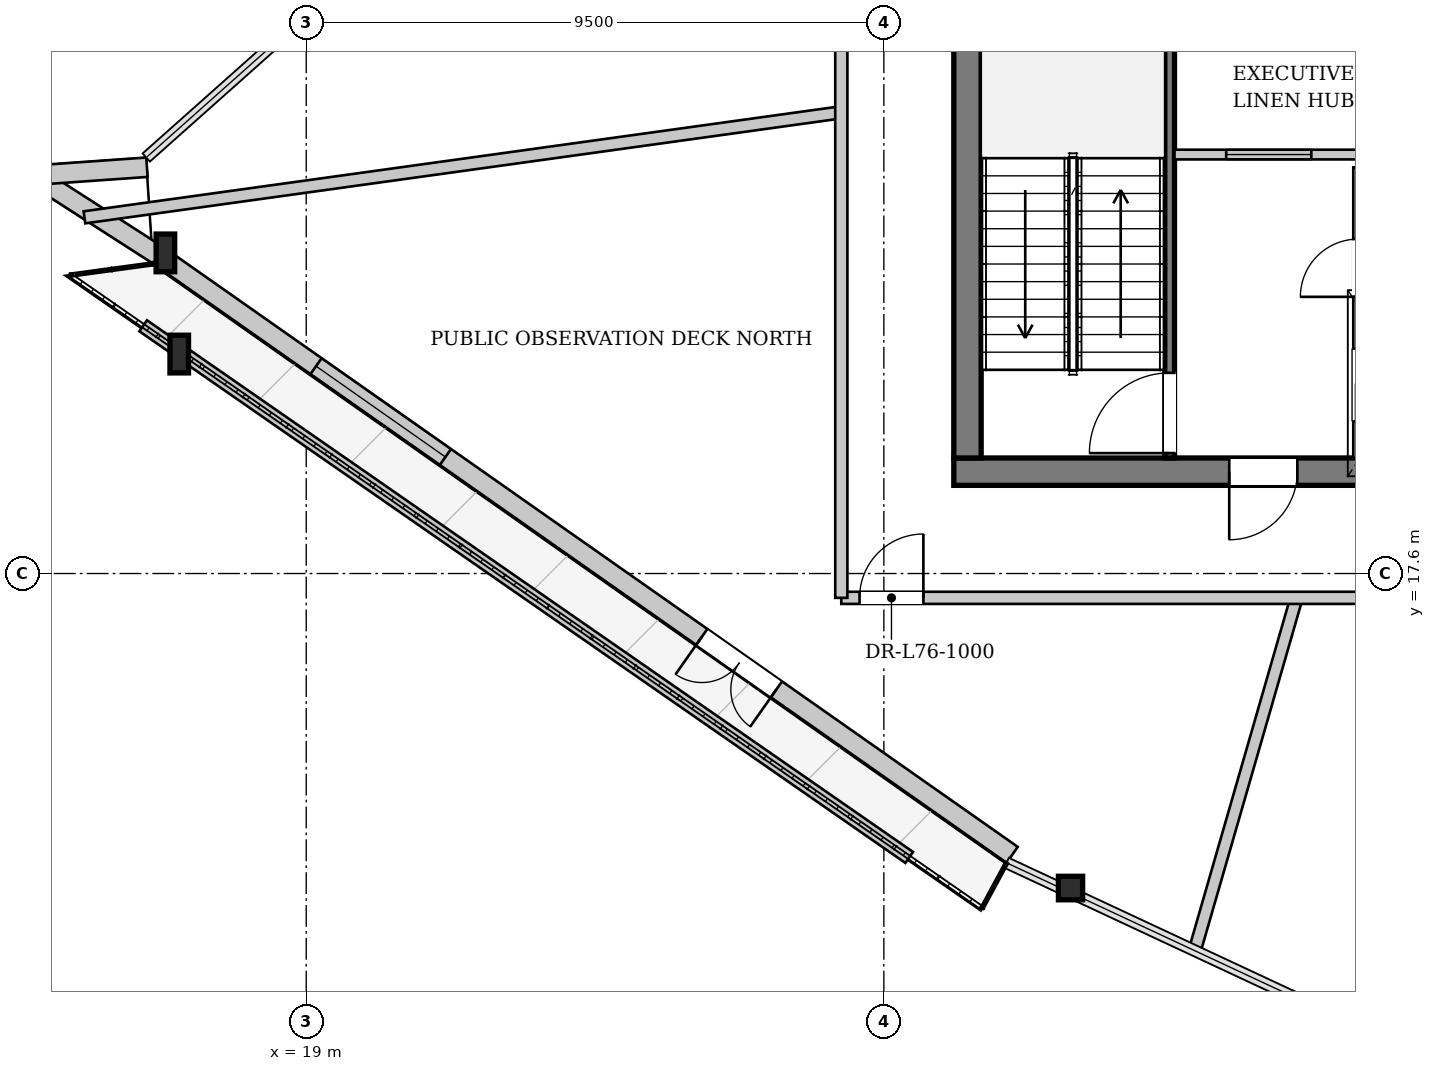
"""IFC4 building model, lengths in metres.
Left out: names, types, materials, properties, quantities, classifications, styles, units other than length and angle.
Written with IfcOpenShell. Run it as: python <this file> out.ifc"""

import sys

from ifc_helpers import new_model, si_unit, direction, frame, frame_2d, origin, origin_2d, place, context, subcontext, project, spatial, rectangle, i_section, extrude, source, transform, mapped, element, fill, save


model = new_model("IFC4")
c1 = context("Model", 3, precision=1e-05, world=origin(), true_north=direction((0.0, 1.0)))
c2 = subcontext(c1, "Body", "Model", "MODEL_VIEW")
j1 = project(units=[si_unit("LENGTHUNIT", "METRE"), si_unit("PLANEANGLEUNIT", "RADIAN")], contexts=[c1])
p1 = place(None, origin())
s1 = spatial("IfcSite", under=j1, at=p1, CompositionType="ELEMENT")
p2 = place(p1, origin())
s2 = spatial("IfcBuilding", under=s1, at=p2, CompositionType="ELEMENT")
p3 = place(p2, frame((0.0, 0.0, 286.1)))
s3 = spatial("IfcBuildingStorey", under=s2, at=p3, CompositionType="ELEMENT", Elevation=286.1)
m1 = source(origin(), c2, "Body", "SweptSolid", [
    extrude(i_section(OverallWidth=0.305, OverallDepth=0.62, WebThickness=0.021, FlangeThickness=0.04, at=origin_2d()), origin(), (0.0, 0.0, 1.0), 5.228),
])
p4 = place(p3, frame((16.369, 24.441, 0.0), z_axis=(0.120474601347, -0.599991532056, 0.790883070935), x_axis=(0.980430716793, 0.196864444651, 0.0)))
e1 = element("IfcColumn", 1, at=p4, inside=s3, PredefinedType="COLUMN", context=c2, shape_type="MappedRepresentation", body=[
    mapped(m1, transform((0.0, 0.0, 0.0), x_axis=(1.0, 0.0, 0.0), y_axis=(0.0, 1.0, 0.0), z_axis=(0.0, 0.0, 1.0), scale=1.0)),
])
m2 = source(origin(), c2, "Body", "SweptSolid", [
    extrude(i_section(OverallWidth=0.305, OverallDepth=0.62, WebThickness=0.021, FlangeThickness=0.04, at=origin_2d()), origin(), (0.0, 0.0, 1.0), 5.161),
])
p5 = place(p3, frame((16.485, 22.693, 0.0), z_axis=(0.165134400152, -0.575203181279, 0.801169102083), x_axis=(0.96117418541, 0.275942358657, 0.0)))
e2 = element("IfcColumn", 2, at=p5, inside=s3, PredefinedType="COLUMN", context=c2, shape_type="MappedRepresentation", body=[
    mapped(m2, transform((0.0, 0.0, 0.0), x_axis=(1.0, 0.0, 0.0), y_axis=(0.0, 1.0, 0.0), z_axis=(0.0, 0.0, 1.0), scale=1.0)),
])
m3 = source(origin(), c2, "Body", "SweptSolid", [
    extrude(i_section(OverallWidth=0.398, OverallDepth=0.387, WebThickness=0.019, FlangeThickness=0.029, at=origin_2d()), origin(), (0.0, 0.0, 1.0), 4.713),
])
p6 = place(p3, frame((30.518, 12.843, 0.0), z_axis=(0.446241604847, -0.176134369222, 0.877408179858), x_axis=(0.367141948921, 0.930164925883, 0.0)))
e3 = element("IfcColumn", 3, at=p6, inside=s3, PredefinedType="COLUMN", context=c2, shape_type="MappedRepresentation", body=[
    mapped(m3, transform((0.0, 0.0, 0.0), x_axis=(1.0, 0.0, 0.0), y_axis=(0.0, 1.0, 0.0), z_axis=(0.0, 0.0, 1.0), scale=1.0)),
])
p7 = place(p3, frame((30.61, 12.974, 0.0), z_axis=(0.0, 0.0, 1.0), x_axis=(-0.818470582771, 0.57454843585, 0.0)))
e4 = element("IfcWall", 4, at=p7, inside=s3, PredefinedType="SOLIDWALL", context=c2, shape_type="SweptSolid", body=[
    extrude(rectangle(XDim=17.145, YDim=0.32, at=frame_2d((8.573, 0.0))), origin(), (0.0, 0.0, 1.0), 3.662),
])
p8 = place(p7, frame((4.737, 0.0, 0.0)))
e5 = element("IfcOpeningElement", 5, at=p8, cuts=e4, PredefinedType="OPENING", context=c2, shape_type="SweptSolid", body=[
    extrude(rectangle(XDim=1.5, YDim=2.3, at=frame_2d((0.75, 1.15))), frame((0.0, 0.17, 0.0), z_axis=(0.0, -1.0, 0.0), x_axis=(1.0, 0.0, 0.0)), (0.0, 0.0, 1.0), 0.34),
])
p9 = place(p7, frame((11.388, 0.0, 0.65)))
e6 = element("IfcOpeningElement", 6, at=p9, cuts=e4, PredefinedType="OPENING", context=c2, shape_type="SweptSolid", body=[
    extrude(rectangle(XDim=2.6, YDim=2.35, at=frame_2d((1.3, 1.175))), frame((0.0, 0.17, 0.0), z_axis=(0.0, -1.0, 0.0), x_axis=(1.0, 0.0, 0.0)), (0.0, 0.0, 1.0), 0.34),
])
p10 = place(p3, frame((16.572, 22.828, 0.0), z_axis=(0.0, 0.0, 1.0), x_axis=(-0.841091692127, 0.540892563671, 0.0)))
e7 = element("IfcWall", 7, at=p10, inside=s3, PredefinedType="SOLIDWALL", context=c2, shape_type="SweptSolid", body=[
    extrude(rectangle(XDim=2.925, YDim=0.32, at=frame_2d((1.463, 0.0))), origin(), (0.0, 0.0, 1.0), 3.662),
])
p11 = place(p3, frame((14.036, 24.116, 0.0), z_axis=(0.0, 0.0, 1.0), x_axis=(0.997516376818, 0.070434920171, 0.0)))
e8 = element("IfcWall", 8, at=p11, inside=s3, PredefinedType="SOLIDWALL", context=c2, shape_type="SweptSolid", body=[
    extrude(rectangle(XDim=2.35, YDim=0.32, at=frame_2d((1.175, 0.0))), origin(), (0.0, 0.0, 1.0), 3.662),
])
p12 = place(p3, frame((16.318, 21.674, 0.0), z_axis=(0.0, 0.0, 1.0), x_axis=(0.821531955781, -0.570162473012, 0.0)))
e9 = element("IfcWall", 9, at=p12, inside=s3, PredefinedType="PARAPET", context=c2, shape_type="SweptSolid", body=[
    extrude(rectangle(XDim=15.335, YDim=0.22, at=frame_2d((7.667, 0.0))), origin(), (0.0, 0.0, 1.0), 0.3),
])
p13 = place(p3, frame((46.35, 19.275, 0.0), z_axis=(0.0, 0.0, 1.0), x_axis=(-1.0, 0.0, 0.0)))
e10 = element("IfcWall", 10, at=p13, inside=s3, PredefinedType="SHEAR", context=c2, shape_type="SweptSolid", body=[
    extrude(rectangle(XDim=16.7, YDim=0.45, at=frame_2d((8.35, 0.0))), origin(), (0.0, 0.0, 1.0), 4.12),
])
p14 = place(p13, frame((4.55, 0.0, 0.0)))
e11 = element("IfcOpeningElement", 11, at=p14, cuts=e10, PredefinedType="OPENING", context=c2, shape_type="SweptSolid", body=[
    extrude(rectangle(XDim=1.12, YDim=2.25, at=frame_2d((0.56, 1.125))), frame((0.0, 0.235, 0.0), z_axis=(0.0, -1.0, 0.0), x_axis=(1.0, 0.0, 0.0)), (0.0, 0.0, 1.0), 0.47),
])
p15 = place(p13, frame((11.05, 0.0, 0.0)))
e12 = element("IfcOpeningElement", 12, at=p15, cuts=e10, PredefinedType="OPENING", context=c2, shape_type="SweptSolid", body=[
    extrude(rectangle(XDim=1.12, YDim=2.25, at=frame_2d((0.56, 1.125))), frame((0.0, 0.235, 0.0), z_axis=(0.0, -1.0, 0.0), x_axis=(1.0, 0.0, 0.0)), (0.0, 0.0, 1.0), 0.47),
])
p16 = place(p3, frame((29.875, 19.5, 0.0), z_axis=(0.0, 0.0, 1.0), x_axis=(0.0, 1.0, 0.0)))
e13 = element("IfcWall", 13, at=p16, inside=s3, PredefinedType="SHEAR", context=c2, shape_type="SweptSolid", body=[
    extrude(rectangle(XDim=14.2, YDim=0.45, at=frame_2d((7.1, 0.0))), origin(), (0.0, 0.0, 1.0), 4.12),
])
p17 = place(p16, frame((7.42, 0.0, 0.0)))
e14 = element("IfcOpeningElement", 14, at=p17, cuts=e13, PredefinedType="OPENING", context=c2, shape_type="SweptSolid", body=[
    extrude(rectangle(XDim=1.6, YDim=2.2, at=frame_2d((0.8, 1.1))), frame((0.0, 0.235, 0.0), z_axis=(0.0, -1.0, 0.0), x_axis=(1.0, 0.0, 0.0)), (0.0, 0.0, 1.0), 0.47),
])
p18 = place(p3, frame((33.2, 19.5, 0.0), z_axis=(0.0, 0.0, 1.0), x_axis=(0.0, 1.0, 0.0)))
e15 = element("IfcWall", 15, at=p18, inside=s3, PredefinedType="PARTITIONING", context=c2, shape_type="SweptSolid", body=[
    extrude(rectangle(XDim=7.46, YDim=0.16, at=frame_2d((3.73, 0.0))), origin(), (0.0, 0.0, 1.0), 4.12),
])
p19 = place(p18, frame((0.08, 0.0, 0.0)))
e16 = element("IfcOpeningElement", 16, at=p19, cuts=e15, PredefinedType="OPENING", context=c2, shape_type="SweptSolid", body=[
    extrude(rectangle(XDim=1.32, YDim=2.2, at=frame_2d((0.66, 1.1))), frame((0.0, 0.09, 0.0), z_axis=(0.0, -1.0, 0.0), x_axis=(1.0, 0.0, 0.0)), (0.0, 0.0, 1.0), 0.18),
])
p20 = place(p3, frame((36.3, 19.5, 0.0), z_axis=(0.0, 0.0, 1.0), x_axis=(0.0, 1.0, 0.0)))
e17 = element("IfcWall", 17, at=p20, inside=s3, PredefinedType="PARTITIONING", context=c2, shape_type="SweptSolid", body=[
    extrude(rectangle(XDim=4.78, YDim=0.16, at=frame_2d((2.39, 0.0))), origin(), (0.0, 0.0, 1.0), 4.12),
])
p21 = place(p20, frame((0.6, 0.0, 0.0)))
e18 = element("IfcOpeningElement", 18, at=p21, cuts=e17, PredefinedType="OPENING", context=c2, shape_type="SweptSolid", body=[
    extrude(rectangle(XDim=1.2, YDim=2.2, at=frame_2d((0.6, 1.1))), frame((0.0, 0.09, 0.0), z_axis=(0.0, -1.0, 0.0), x_axis=(1.0, 0.0, 0.0)), (0.0, 0.0, 1.0), 0.18),
])
p22 = place(p20, frame((2.65, 0.0, 0.0)))
e19 = element("IfcOpeningElement", 19, at=p22, cuts=e17, PredefinedType="OPENING", context=c2, shape_type="SweptSolid", body=[
    extrude(rectangle(XDim=0.95, YDim=2.1, at=frame_2d((0.475, 1.05))), frame((0.0, 0.09, 0.0), z_axis=(0.0, -1.0, 0.0), x_axis=(1.0, 0.0, 0.0)), (0.0, 0.0, 1.0), 0.18),
])
p23 = place(p3, frame((33.28, 24.49, 0.0), z_axis=(0.0, 0.0, 1.0), x_axis=(1.0, 0.0, 0.0)))
e20 = element("IfcWall", 20, at=p23, inside=s3, PredefinedType="PARTITIONING", context=c2, shape_type="SweptSolid", body=[
    extrude(rectangle(XDim=9.44, YDim=0.16, at=frame_2d((4.72, 0.0))), origin(), (0.0, 0.0, 1.0), 4.12),
])
p24 = place(p23, frame((0.85, 0.0, 0.95)))
e21 = element("IfcOpeningElement", 21, at=p24, cuts=e20, PredefinedType="OPENING", context=c2, shape_type="SweptSolid", body=[
    extrude(rectangle(XDim=1.4, YDim=1.8, at=frame_2d((0.7, 0.9))), frame((0.0, 0.09, 0.0), z_axis=(0.0, -1.0, 0.0), x_axis=(1.0, 0.0, 0.0)), (0.0, 0.0, 1.0), 0.18),
])
p25 = place(p3, frame((27.8, 25.185, 0.0), z_axis=(0.0, 0.0, 1.0), x_axis=(-0.990511455739, -0.137430186092, 0.0)))
e22 = element("IfcWall", 22, at=p25, inside=s3, PredefinedType="PARTITIONING", context=c2, shape_type="SweptSolid", body=[
    extrude(rectangle(XDim=12.567, YDim=0.2, at=frame_2d((6.283, 0.0))), origin(), (0.0, 0.0, 1.0), 4.12),
])
p26 = place(p3, frame((35.287, 17.2, 0.0), z_axis=(0.0, 0.0, 1.0), x_axis=(-0.277312132805, -0.960779881658, 0.0)))
e23 = element("IfcWall", 23, at=p26, inside=s3, PredefinedType="PARTITIONING", context=c2, shape_type="SweptSolid", body=[
    extrude(rectangle(XDim=6.009, YDim=0.2, at=frame_2d((3.004, 0.0))), origin(), (0.0, 0.0, 1.0), 4.12),
])
p27 = place(p3, frame((27.8, 17.2, 0.0), z_axis=(0.0, 0.0, 1.0), x_axis=(1.0, 0.0, 0.0)))
e24 = element("IfcWall", 24, at=p27, inside=s3, PredefinedType="PARTITIONING", context=c2, shape_type="SweptSolid", body=[
    extrude(rectangle(XDim=20.4, YDim=0.2, at=frame_2d((10.2, 0.0))), origin(), (0.0, 0.0, 1.0), 3.865),
])
p28 = place(p27, frame((0.3, 0.0, 0.0)))
e25 = element("IfcOpeningElement", 25, at=p28, cuts=e24, PredefinedType="OPENING", context=c2, shape_type="SweptSolid", body=[
    extrude(rectangle(XDim=1.05, YDim=2.2, at=frame_2d((0.525, 1.1))), frame((0.0, 0.11, 0.0), z_axis=(0.0, -1.0, 0.0), x_axis=(1.0, 0.0, 0.0)), (0.0, 0.0, 1.0), 0.22),
])
p29 = place(p27, frame((15.101, 0.0, 0.0)))
e26 = element("IfcOpeningElement", 26, at=p29, cuts=e24, PredefinedType="OPENING", context=c2, shape_type="SweptSolid", body=[
    extrude(rectangle(XDim=1.05, YDim=2.2, at=frame_2d((0.525, 1.1))), frame((0.0, 0.11, 0.0), z_axis=(0.0, -1.0, 0.0), x_axis=(1.0, 0.0, 0.0)), (0.0, 0.0, 1.0), 0.22),
])
p30 = place(p3, frame((27.8, 17.2, 0.0), z_axis=(0.0, 0.0, 1.0), x_axis=(0.0, 1.0, 0.0)))
e27 = element("IfcWall", 27, at=p30, inside=s3, PredefinedType="PARTITIONING", context=c2, shape_type="SweptSolid", body=[
    extrude(rectangle(XDim=17.374, YDim=0.2, at=frame_2d((8.687, 0.0))), origin(), (0.0, 0.0, 1.0), 4.12),
])
p31 = place(p30, frame((11.62, 0.0, 0.0)))
e28 = element("IfcOpeningElement", 28, at=p31, cuts=e27, PredefinedType="OPENING", context=c2, shape_type="SweptSolid", body=[
    extrude(rectangle(XDim=1.6, YDim=2.2, at=frame_2d((0.8, 1.1))), frame((0.0, 0.11, 0.0), z_axis=(0.0, -1.0, 0.0), x_axis=(1.0, 0.0, 0.0)), (0.0, 0.0, 1.0), 0.22),
])
m4 = source(origin(), c2, "Body", "SweptSolid", [
    extrude(rectangle(XDim=1.5, YDim=2.3, at=frame_2d((0.75, 1.15))), frame((0.0, 0.025, 0.0), z_axis=(0.0, -1.0, 0.0), x_axis=(1.0, 0.0, 0.0)), (0.0, 0.0, 1.0), 0.05),
])
p32 = place(p8, origin())
e29 = element("IfcDoor", 29, at=p32, inside=s3, OperationType="DOUBLE_DOOR_SINGLE_SWING", PredefinedType="DOOR", context=c2, shape_type="MappedRepresentation", body=[
    mapped(m4, transform((0.0, 0.0, 0.0), x_axis=(1.0, 0.0, 0.0), y_axis=(0.0, 1.0, 0.0), z_axis=(0.0, 0.0, 1.0), scale=1.0)),
])
fill(e5, e29)
m5 = source(origin(), c2, "Body", "SweptSolid", [
    extrude(rectangle(XDim=2.6, YDim=2.35, at=frame_2d((1.3, 1.175))), frame((0.0, 0.03, 0.0), z_axis=(0.0, -1.0, 0.0), x_axis=(1.0, 0.0, 0.0)), (0.0, 0.0, 1.0), 0.06),
])
p33 = place(p9, origin())
e30 = element("IfcWindow", 30, at=p33, inside=s3, PartitioningType="SINGLE_PANEL", PredefinedType="WINDOW", context=c2, shape_type="MappedRepresentation", body=[
    mapped(m5, transform((0.0, 0.0, 0.0), x_axis=(1.0, 0.0, 0.0), y_axis=(0.0, 1.0, 0.0), z_axis=(0.0, 0.0, 1.0), scale=1.0)),
])
fill(e6, e30)
m6 = source(origin(), c2, "Body", "SweptSolid", [
    extrude(rectangle(XDim=1.12, YDim=2.25, at=frame_2d((0.56, 1.125))), frame((0.0, 0.025, 0.0), z_axis=(0.0, -1.0, 0.0), x_axis=(1.0, 0.0, 0.0)), (0.0, 0.0, 1.0), 0.05),
])
p34 = place(p15, origin())
e31 = element("IfcDoor", 31, at=p34, inside=s3, OperationType="SINGLE_SWING_RIGHT", PredefinedType="DOOR", context=c2, shape_type="MappedRepresentation", body=[
    mapped(m6, transform((0.0, 0.0, 0.0), x_axis=(1.0, 0.0, 0.0), y_axis=(0.0, 1.0, 0.0), z_axis=(0.0, 0.0, 1.0), scale=1.0)),
])
fill(e12, e31)
m7 = source(origin(), c2, "Body", "SweptSolid", [
    extrude(rectangle(XDim=1.32, YDim=2.2, at=frame_2d((0.66, 1.1))), frame((0.0, 0.025, 0.0), z_axis=(0.0, -1.0, 0.0), x_axis=(1.0, 0.0, 0.0)), (0.0, 0.0, 1.0), 0.05),
])
p35 = place(p19, origin())
e32 = element("IfcDoor", 32, at=p35, inside=s3, OperationType="SINGLE_SWING_LEFT", PredefinedType="DOOR", context=c2, shape_type="MappedRepresentation", body=[
    mapped(m7, transform((0.0, 0.0, 0.0), x_axis=(1.0, 0.0, 0.0), y_axis=(0.0, 1.0, 0.0), z_axis=(0.0, 0.0, 1.0), scale=1.0)),
])
fill(e16, e32)
m8 = source(origin(), c2, "Body", "SweptSolid", [
    extrude(rectangle(XDim=1.05, YDim=2.2, at=frame_2d((0.525, 1.1))), frame((0.0, 0.025, 0.0), z_axis=(0.0, -1.0, 0.0), x_axis=(1.0, 0.0, 0.0)), (0.0, 0.0, 1.0), 0.05),
])
p36 = place(p28, origin())
e33 = element("IfcDoor", 33, at=p36, inside=s3, OperationType="SINGLE_SWING_RIGHT", PredefinedType="DOOR", context=c2, shape_type="MappedRepresentation", body=[
    mapped(m8, transform((0.0, 0.0, 0.0), x_axis=(1.0, 0.0, 0.0), y_axis=(0.0, 1.0, 0.0), z_axis=(0.0, 0.0, 1.0), scale=1.0)),
])
fill(e25, e33)
m9 = source(origin(), c2, "Body", "SweptSolid", [
    extrude(rectangle(XDim=1.4, YDim=1.8, at=frame_2d((0.7, 0.9))), frame((0.0, 0.03, 0.0), z_axis=(0.0, -1.0, 0.0), x_axis=(1.0, 0.0, 0.0)), (0.0, 0.0, 1.0), 0.06),
])
p37 = place(p24, origin())
e34 = element("IfcWindow", 34, at=p37, inside=s3, PartitioningType="SINGLE_PANEL", PredefinedType="WINDOW", context=c2, shape_type="MappedRepresentation", body=[
    mapped(m9, transform((0.0, 0.0, 0.0), x_axis=(1.0, 0.0, 0.0), y_axis=(0.0, 1.0, 0.0), z_axis=(0.0, 0.0, 1.0), scale=1.0)),
])
fill(e21, e34)
save(model, sys.argv[1])
